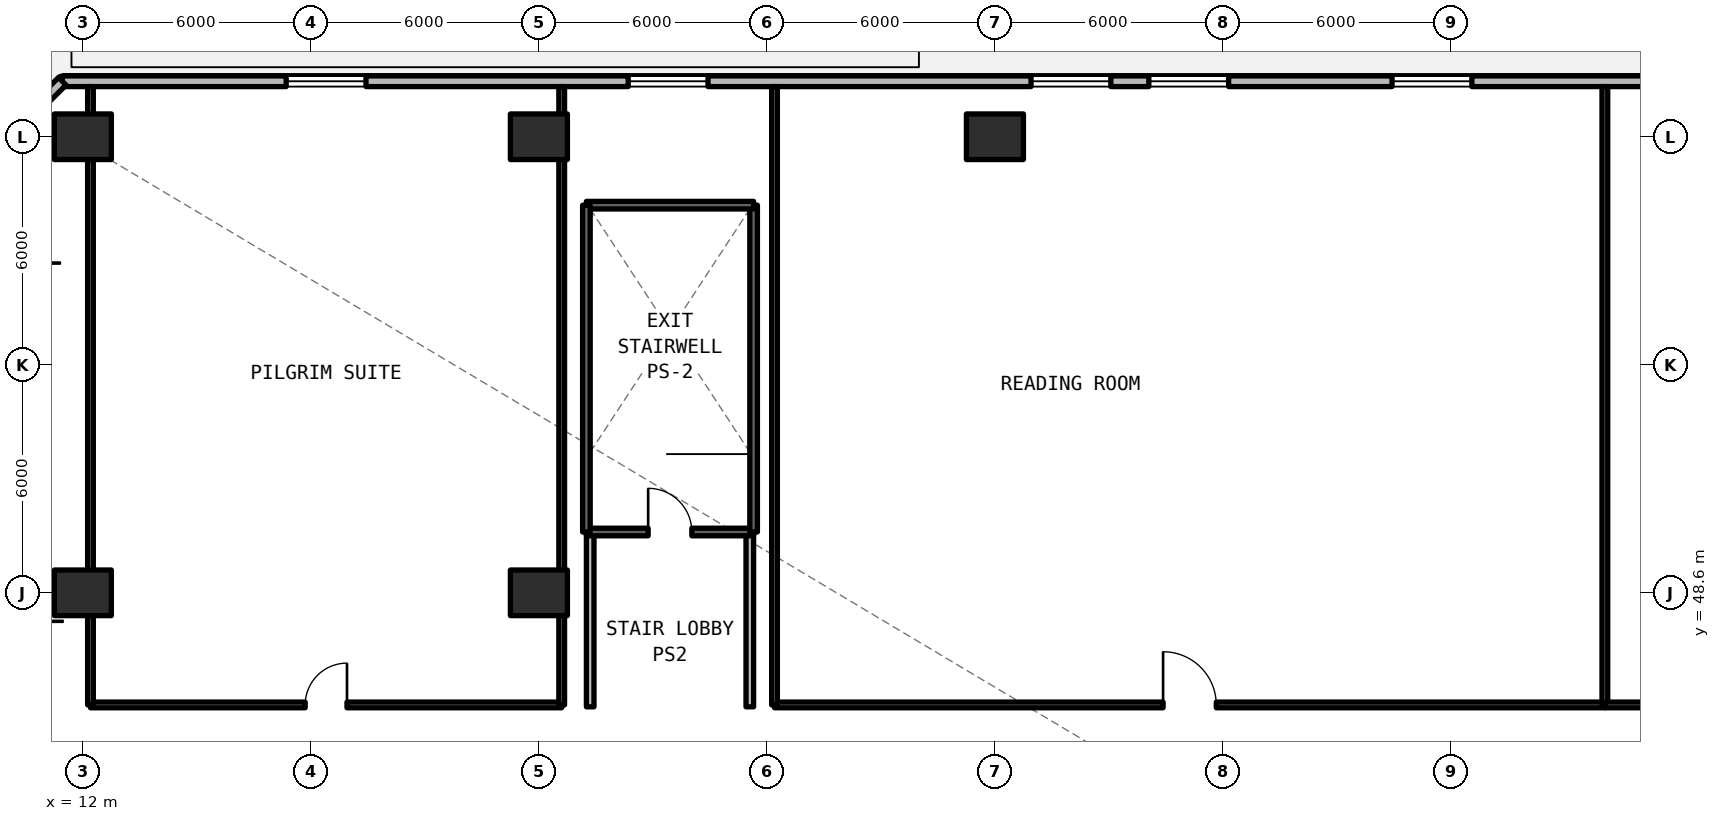
"""IFC4 building model, lengths in metres.
Left out: names, types, materials, properties, quantities, classifications, styles, units other than length and angle.
Written with IfcOpenShell. Run it as: python <this file> out.ifc"""

import sys

from ifc_helpers import new_model, si_unit, direction, frame, frame_2d, origin, origin_2d, place, context, subcontext, project, spatial, rectangle, extrude, element, fill, save


model = new_model("IFC4")
c1 = context("Model", 3, precision=1e-05, world=origin(), true_north=direction((0.0, 1.0)))
c2 = subcontext(c1, "Body", "Model", "MODEL_VIEW")
j1 = project(units=[si_unit("LENGTHUNIT", "METRE"), si_unit("PLANEANGLEUNIT", "RADIAN")], contexts=[c1])
p1 = place(None, origin())
s1 = spatial("IfcSite", under=j1, at=p1, CompositionType="ELEMENT")
p2 = place(p1, origin())
s2 = spatial("IfcBuilding", under=s1, at=p2, CompositionType="ELEMENT")
p3 = place(p2, frame((0.0, 0.0, 24.09)))
s3 = spatial("IfcBuildingStorey", under=s2, at=p3, CompositionType="ELEMENT", Elevation=24.09)
for number, where, z_axis, x_axis in (
    (1, (12.0, 60.6, 0.0), (0.0, 0.0, 1.0), (1.0, 0.0, 0.0)),
    (2, (24.0, 60.6, 0.0), (0.0, 0.0, 1.0), (1.0, 0.0, 0.0)),
    (3, (36.0, 60.6, 0.0), (0.0, 0.0, 1.0), (1.0, 0.0, 0.0)),
    (4, (12.0, 48.6, 0.0), (0.0, 0.0, 1.0), (1.0, 0.0, 0.0)),
):
    element("IfcColumn", number, at=place(p3, frame(where, z_axis=z_axis, x_axis=x_axis)), inside=s3, PredefinedType="COLUMN", context=c2, shape_type="SweptSolid", body=[
        extrude(rectangle(XDim=1.5, YDim=1.2, at=origin_2d()), origin(), (0.0, 0.0, 1.0), 4.71),
    ])
p4 = place(p3, frame((24.0, 48.6, 0.0), z_axis=(0.0, 0.0, 1.0), x_axis=(1.0, 0.0, 0.0)))
e5 = element("IfcColumn", 5, at=p4, inside=s3, PredefinedType="COLUMN", context=c2, shape_type="SweptSolid", body=[
    extrude(rectangle(XDim=1.5, YDim=1.2, at=origin_2d()), origin(), (0.0, 0.0, 1.0), 4.95),
])
p5 = place(p3, frame((102.542, 62.06, 0.0), z_axis=(0.0, 0.0, 1.0), x_axis=(-1.0, 0.0, 0.0)))
e6 = element("IfcWall", 6, at=p5, inside=s3, PredefinedType="SOLIDWALL", context=c2, shape_type="SweptSolid", body=[
    extrude(rectangle(XDim=91.084, YDim=0.28, at=frame_2d((45.542, 0.0))), origin(), (0.0, 0.0, 1.0), 4.71),
])
p6 = place(p5, frame((44.792, 0.0, 0.0)))
e7 = element("IfcOpeningElement", 7, at=p6, cuts=e6, PredefinedType="OPENING", context=c2, shape_type="SweptSolid", body=[
    extrude(rectangle(XDim=1.5, YDim=2.2, at=frame_2d((0.75, 1.1))), frame((0.0, 0.15, 0.0), z_axis=(0.0, -1.0, 0.0), x_axis=(1.0, 0.0, 0.0)), (0.0, 0.0, 1.0), 0.3),
])
p7 = place(p5, frame((60.392, 0.0, 0.78)))
e8 = element("IfcOpeningElement", 8, at=p7, cuts=e6, PredefinedType="OPENING", context=c2, shape_type="SweptSolid", body=[
    extrude(rectangle(XDim=2.1, YDim=1.66, at=frame_2d((1.05, 0.83))), frame((0.0, 0.15, 0.0), z_axis=(0.0, -1.0, 0.0), x_axis=(1.0, 0.0, 0.0)), (0.0, 0.0, 1.0), 0.3),
])
p8 = place(p5, frame((25.492, 0.0, 0.78)))
e9 = element("IfcOpeningElement", 9, at=p8, cuts=e6, PredefinedType="OPENING", context=c2, shape_type="SweptSolid", body=[
    extrude(rectangle(XDim=2.1, YDim=1.66, at=frame_2d((1.05, 0.83))), frame((0.0, 0.15, 0.0), z_axis=(0.0, -1.0, 0.0), x_axis=(1.0, 0.0, 0.0)), (0.0, 0.0, 1.0), 0.3),
])
p9 = place(p5, frame((83.092, 0.0, 0.78)))
e10 = element("IfcOpeningElement", 10, at=p9, cuts=e6, PredefinedType="OPENING", context=c2, shape_type="SweptSolid", body=[
    extrude(rectangle(XDim=2.1, YDim=1.66, at=frame_2d((1.05, 0.83))), frame((0.0, 0.15, 0.0), z_axis=(0.0, -1.0, 0.0), x_axis=(1.0, 0.0, 0.0)), (0.0, 0.0, 1.0), 0.3),
])
p10 = place(p5, frame((6.142, 0.0, 0.78)))
e11 = element("IfcOpeningElement", 11, at=p10, cuts=e6, PredefinedType="OPENING", context=c2, shape_type="SweptSolid", body=[
    extrude(rectangle(XDim=2.1, YDim=1.66, at=frame_2d((1.05, 0.83))), frame((0.0, 0.15, 0.0), z_axis=(0.0, -1.0, 0.0), x_axis=(1.0, 0.0, 0.0)), (0.0, 0.0, 1.0), 0.3),
])
p11 = place(p5, frame((32.792, 0.0, 0.78)))
e12 = element("IfcOpeningElement", 12, at=p11, cuts=e6, PredefinedType="OPENING", context=c2, shape_type="SweptSolid", body=[
    extrude(rectangle(XDim=2.1, YDim=1.66, at=frame_2d((1.05, 0.83))), frame((0.0, 0.15, 0.0), z_axis=(0.0, -1.0, 0.0), x_axis=(1.0, 0.0, 0.0)), (0.0, 0.0, 1.0), 0.3),
])
p12 = place(p5, frame((74.092, 0.0, 0.78)))
e13 = element("IfcOpeningElement", 13, at=p12, cuts=e6, PredefinedType="OPENING", context=c2, shape_type="SweptSolid", body=[
    extrude(rectangle(XDim=2.1, YDim=1.66, at=frame_2d((1.05, 0.83))), frame((0.0, 0.15, 0.0), z_axis=(0.0, -1.0, 0.0), x_axis=(1.0, 0.0, 0.0)), (0.0, 0.0, 1.0), 0.3),
])
p13 = place(p5, frame((53.992, 0.0, 0.78)))
e14 = element("IfcOpeningElement", 14, at=p13, cuts=e6, PredefinedType="OPENING", context=c2, shape_type="SweptSolid", body=[
    extrude(rectangle(XDim=2.1, YDim=1.66, at=frame_2d((1.05, 0.83))), frame((0.0, 0.15, 0.0), z_axis=(0.0, -1.0, 0.0), x_axis=(1.0, 0.0, 0.0)), (0.0, 0.0, 1.0), 0.3),
])
p14 = place(p5, frame((63.492, 0.0, 0.78)))
e15 = element("IfcOpeningElement", 15, at=p14, cuts=e6, PredefinedType="OPENING", context=c2, shape_type="SweptSolid", body=[
    extrude(rectangle(XDim=2.1, YDim=1.66, at=frame_2d((1.05, 0.83))), frame((0.0, 0.15, 0.0), z_axis=(0.0, -1.0, 0.0), x_axis=(1.0, 0.0, 0.0)), (0.0, 0.0, 1.0), 0.3),
])
p15 = place(p3, frame((11.458, 62.06, 0.0), z_axis=(0.0, 0.0, 1.0), x_axis=(-0.707106781187, -0.707106781187, 0.0)))
e16 = element("IfcWall", 16, at=p15, inside=s3, PredefinedType="SOLIDWALL", context=c2, shape_type="SweptSolid", body=[
    extrude(rectangle(XDim=3.278, YDim=0.28, at=frame_2d((1.639, 0.0))), origin(), (0.0, 0.0, 1.0), 4.71),
])
p16 = place(p15, frame((1.534, 0.0, 0.78)))
e17 = element("IfcOpeningElement", 17, at=p16, cuts=e16, PredefinedType="OPENING", context=c2, shape_type="SweptSolid", body=[
    extrude(rectangle(XDim=0.85, YDim=1.65, at=frame_2d((0.425, 0.825))), frame((0.0, 0.15, 0.0), z_axis=(0.0, -1.0, 0.0), x_axis=(1.0, 0.0, 0.0)), (0.0, 0.0, 1.0), 0.3),
])
for number, where, z_axis, x_axis in (
    (18, (25.35, 45.6, 0.0), (0.0, 0.0, 1.0), (0.0, 1.0, 0.0)),
    (19, (29.55, 45.6, 0.0), (0.0, 0.0, 1.0), (0.0, 1.0, 0.0)),
):
    element("IfcWall", number, at=place(p3, frame(where, z_axis=z_axis, x_axis=x_axis)), inside=s3, PredefinedType="SOLIDWALL", context=c2, shape_type="SweptSolid", body=[
        extrude(rectangle(XDim=4.6, YDim=0.2, at=frame_2d((2.3, 0.0))), origin(), (0.0, 0.0, 1.0), 3.93),
    ])
p17 = place(p3, frame((30.2, 45.65, 0.0), z_axis=(0.0, 0.0, 1.0), x_axis=(1.0, 0.0, 0.0)))
e20 = element("IfcWall", 20, at=p17, inside=s3, PredefinedType="SOLIDWALL", context=c2, shape_type="SweptSolid", body=[
    extrude(rectangle(XDim=21.85, YDim=0.15, at=frame_2d((10.925, 0.0))), origin(), (0.0, 0.0, 1.0), 3.93),
])
p18 = place(p17, frame((10.225, 0.0, 0.0)))
e21 = element("IfcOpeningElement", 21, at=p18, cuts=e20, PredefinedType="OPENING", context=c2, shape_type="SweptSolid", body=[
    extrude(rectangle(XDim=1.4, YDim=2.15, at=frame_2d((0.7, 1.075))), frame((0.0, 0.085, 0.0), z_axis=(0.0, -1.0, 0.0), x_axis=(1.0, 0.0, 0.0)), (0.0, 0.0, 1.0), 0.17),
])
p19 = place(p3, frame((30.2, 45.65, 0.0), z_axis=(0.0, 0.0, 1.0), x_axis=(0.0, 1.0, 0.0)))
e22 = element("IfcWall", 22, at=p19, inside=s3, PredefinedType="SOLIDWALL", context=c2, shape_type="SweptSolid", body=[
    extrude(rectangle(XDim=16.27, YDim=0.15, at=frame_2d((8.135, 0.0))), origin(), (0.0, 0.0, 1.0), 3.687),
])
p20 = place(p3, frame((52.05, 45.65, 0.0), z_axis=(0.0, 0.0, 1.0), x_axis=(0.0, 1.0, 0.0)))
e23 = element("IfcWall", 23, at=p20, inside=s3, PredefinedType="SOLIDWALL", context=c2, shape_type="SweptSolid", body=[
    extrude(rectangle(XDim=16.27, YDim=0.15, at=frame_2d((8.135, 0.0))), origin(), (0.0, 0.0, 1.0), 3.93),
])
p21 = place(p3, frame((52.05, 45.65, 0.0), z_axis=(0.0, 0.0, 1.0), x_axis=(1.0, 0.0, 0.0)))
e24 = element("IfcWall", 24, at=p21, inside=s3, PredefinedType="SOLIDWALL", context=c2, shape_type="SweptSolid", body=[
    extrude(rectangle(XDim=14.15, YDim=0.15, at=frame_2d((7.075, 0.0))), origin(), (0.0, 0.0, 1.0), 3.93),
])
p22 = place(p21, frame((6.525, 0.0, 0.0)))
e25 = element("IfcOpeningElement", 25, at=p22, cuts=e24, PredefinedType="OPENING", context=c2, shape_type="SweptSolid", body=[
    extrude(rectangle(XDim=1.1, YDim=2.15, at=frame_2d((0.55, 1.075))), frame((0.0, 0.085, 0.0), z_axis=(0.0, -1.0, 0.0), x_axis=(1.0, 0.0, 0.0)), (0.0, 0.0, 1.0), 0.17),
])
p23 = place(p3, frame((12.2, 45.65, 0.0), z_axis=(0.0, 0.0, 1.0), x_axis=(1.0, 0.0, 0.0)))
e26 = element("IfcWall", 26, at=p23, inside=s3, PredefinedType="SOLIDWALL", context=c2, shape_type="SweptSolid", body=[
    extrude(rectangle(XDim=12.4, YDim=0.15, at=frame_2d((6.2, 0.0))), origin(), (0.0, 0.0, 1.0), 3.93),
])
p24 = place(p23, frame((5.65, 0.0, 0.0)))
e27 = element("IfcOpeningElement", 27, at=p24, cuts=e26, PredefinedType="OPENING", context=c2, shape_type="SweptSolid", body=[
    extrude(rectangle(XDim=1.1, YDim=2.15, at=frame_2d((0.55, 1.075))), frame((0.0, 0.085, 0.0), z_axis=(0.0, -1.0, 0.0), x_axis=(1.0, 0.0, 0.0)), (0.0, 0.0, 1.0), 0.17),
])
for number, where, z_axis, x_axis in (
    (28, (12.2, 45.65, 0.0), (0.0, 0.0, 1.0), (0.0, 1.0, 0.0)),
    (29, (24.6, 45.65, 0.0), (0.0, 0.0, 1.0), (0.0, 1.0, 0.0)),
):
    element("IfcWall", number, at=place(p3, frame(where, z_axis=z_axis, x_axis=x_axis)), inside=s3, PredefinedType="SOLIDWALL", context=c2, shape_type="SweptSolid", body=[
        extrude(rectangle(XDim=16.27, YDim=0.15, at=frame_2d((8.135, 0.0))), origin(), (0.0, 0.0, 1.0), 3.93),
    ])
p25 = place(p3, frame((25.25, 50.2, 0.0), z_axis=(0.0, 0.0, 1.0), x_axis=(1.0, 0.0, 0.0)))
e30 = element("IfcWall", 30, at=p25, inside=s3, PredefinedType="SOLIDWALL", context=c2, shape_type="SweptSolid", body=[
    extrude(rectangle(XDim=4.4, YDim=0.2, at=frame_2d((2.2, 0.0))), origin(), (0.0, 0.0, 1.0), 4.95),
])
p26 = place(p25, frame((1.625, 0.0, 0.0)))
e31 = element("IfcOpeningElement", 31, at=p26, cuts=e30, PredefinedType="OPENING", context=c2, shape_type="SweptSolid", body=[
    extrude(rectangle(XDim=1.15, YDim=2.15, at=frame_2d((0.575, 1.075))), frame((0.0, 0.11, 0.0), z_axis=(0.0, -1.0, 0.0), x_axis=(1.0, 0.0, 0.0)), (0.0, 0.0, 1.0), 0.22),
])
p27 = place(p3, frame((29.65, 50.2, 0.0), z_axis=(0.0, 0.0, 1.0), x_axis=(0.0, 1.0, 0.0)))
e32 = element("IfcWall", 32, at=p27, inside=s3, PredefinedType="SOLIDWALL", context=c2, shape_type="SweptSolid", body=[
    extrude(rectangle(XDim=8.6, YDim=0.2, at=frame_2d((4.3, 0.0))), origin(), (0.0, 0.0, 1.0), 4.95),
])
p28 = place(p3, frame((29.65, 58.8, 0.0), z_axis=(0.0, 0.0, 1.0), x_axis=(-1.0, 0.0, 0.0)))
e33 = element("IfcWall", 33, at=p28, inside=s3, PredefinedType="SOLIDWALL", context=c2, shape_type="SweptSolid", body=[
    extrude(rectangle(XDim=4.4, YDim=0.2, at=frame_2d((2.2, 0.0))), origin(), (0.0, 0.0, 1.0), 4.95),
])
p29 = place(p3, frame((25.25, 58.8, 0.0), z_axis=(0.0, 0.0, 1.0), x_axis=(0.0, -1.0, 0.0)))
e34 = element("IfcWall", 34, at=p29, inside=s3, PredefinedType="SOLIDWALL", context=c2, shape_type="SweptSolid", body=[
    extrude(rectangle(XDim=8.6, YDim=0.2, at=frame_2d((4.3, 0.0))), origin(), (0.0, 0.0, 1.0), 4.95),
])
p30 = place(p7, origin())
e35 = element("IfcWindow", 35, at=p30, inside=s3, PartitioningType="SINGLE_PANEL", PredefinedType="WINDOW", context=c2, shape_type="SweptSolid", body=[
    extrude(rectangle(XDim=2.1, YDim=1.66, at=frame_2d((1.05, 0.83))), frame((0.0, 0.03, 0.0), z_axis=(0.0, -1.0, 0.0), x_axis=(1.0, 0.0, 0.0)), (0.0, 0.0, 1.0), 0.06),
])
fill(e8, e35)
p31 = place(p9, origin())
e36 = element("IfcWindow", 36, at=p31, inside=s3, PartitioningType="SINGLE_PANEL", PredefinedType="WINDOW", context=c2, shape_type="SweptSolid", body=[
    extrude(rectangle(XDim=2.1, YDim=1.66, at=frame_2d((1.05, 0.83))), frame((0.0, 0.03, 0.0), z_axis=(0.0, -1.0, 0.0), x_axis=(1.0, 0.0, 0.0)), (0.0, 0.0, 1.0), 0.06),
])
fill(e10, e36)
p32 = place(p12, origin())
e37 = element("IfcWindow", 37, at=p32, inside=s3, PartitioningType="SINGLE_PANEL", PredefinedType="WINDOW", context=c2, shape_type="SweptSolid", body=[
    extrude(rectangle(XDim=2.1, YDim=1.66, at=frame_2d((1.05, 0.83))), frame((0.0, 0.03, 0.0), z_axis=(0.0, -1.0, 0.0), x_axis=(1.0, 0.0, 0.0)), (0.0, 0.0, 1.0), 0.06),
])
fill(e13, e37)
p33 = place(p13, origin())
e38 = element("IfcWindow", 38, at=p33, inside=s3, PartitioningType="SINGLE_PANEL", PredefinedType="WINDOW", context=c2, shape_type="SweptSolid", body=[
    extrude(rectangle(XDim=2.1, YDim=1.66, at=frame_2d((1.05, 0.83))), frame((0.0, 0.03, 0.0), z_axis=(0.0, -1.0, 0.0), x_axis=(1.0, 0.0, 0.0)), (0.0, 0.0, 1.0), 0.06),
])
fill(e14, e38)
p34 = place(p14, origin())
e39 = element("IfcWindow", 39, at=p34, inside=s3, PartitioningType="SINGLE_PANEL", PredefinedType="WINDOW", context=c2, shape_type="SweptSolid", body=[
    extrude(rectangle(XDim=2.1, YDim=1.66, at=frame_2d((1.05, 0.83))), frame((0.0, 0.03, 0.0), z_axis=(0.0, -1.0, 0.0), x_axis=(1.0, 0.0, 0.0)), (0.0, 0.0, 1.0), 0.06),
])
fill(e15, e39)
p35 = place(p18, origin())
e40 = element("IfcDoor", 40, at=p35, inside=s3, OperationType="SINGLE_SWING_LEFT", PredefinedType="DOOR", context=c2, shape_type="SweptSolid", body=[
    extrude(rectangle(XDim=1.4, YDim=2.15, at=frame_2d((0.7, 1.075))), frame((0.0, 0.025, 0.0), z_axis=(0.0, -1.0, 0.0), x_axis=(1.0, 0.0, 0.0)), (0.0, 0.0, 1.0), 0.05),
])
fill(e21, e40)
p36 = place(p24, origin())
e41 = element("IfcDoor", 41, at=p36, inside=s3, OperationType="SINGLE_SWING_RIGHT", PredefinedType="DOOR", context=c2, shape_type="SweptSolid", body=[
    extrude(rectangle(XDim=1.1, YDim=2.15, at=frame_2d((0.55, 1.075))), frame((0.0, 0.025, 0.0), z_axis=(0.0, -1.0, 0.0), x_axis=(1.0, 0.0, 0.0)), (0.0, 0.0, 1.0), 0.05),
])
fill(e27, e41)
p37 = place(p26, origin())
e42 = element("IfcDoor", 42, at=p37, inside=s3, OperationType="SINGLE_SWING_LEFT", PredefinedType="DOOR", context=c2, shape_type="SweptSolid", body=[
    extrude(rectangle(XDim=1.15, YDim=2.15, at=frame_2d((0.575, 1.075))), frame((0.0, 0.025, 0.0), z_axis=(0.0, -1.0, 0.0), x_axis=(1.0, 0.0, 0.0)), (0.0, 0.0, 1.0), 0.05),
])
fill(e31, e42)
save(model, sys.argv[1])
